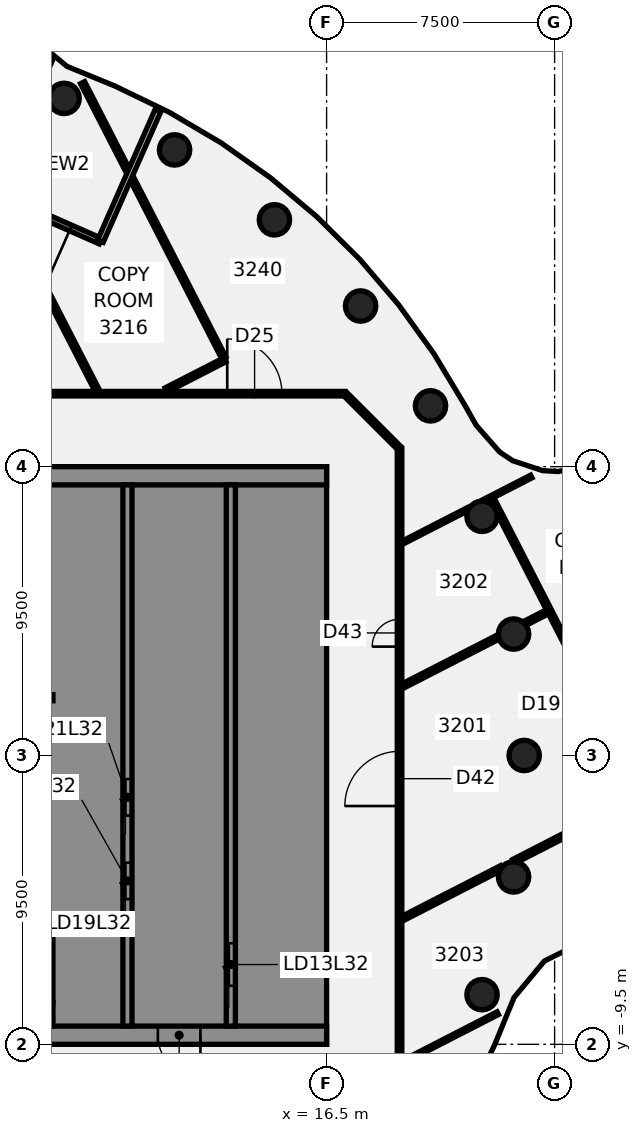
"""IFC4 building model, lengths in metres.
Left out: names, types, materials, properties, quantities, classifications, styles, units other than length and angle.
Written with IfcOpenShell. Run it as: python <this file> out.ifc"""

import sys

from ifc_helpers import new_model, si_unit, direction, frame, frame_2d, origin, origin_2d, place, context, subcontext, project, spatial, polyline, rectangle, circle, outline, extrude, element, fill, save


model = new_model("IFC4")
c1 = context("Model", 3, precision=1e-05, world=origin(), true_north=direction((0.0, 1.0)))
c2 = subcontext(c1, "Body", "Model", "MODEL_VIEW")
j1 = project(units=[si_unit("LENGTHUNIT", "METRE"), si_unit("PLANEANGLEUNIT", "RADIAN")], contexts=[c1])
p1 = place(None, origin())
s1 = spatial("IfcSite", under=j1, at=p1, CompositionType="ELEMENT")
p2 = place(p1, origin())
s2 = spatial("IfcBuilding", under=s1, at=p2, CompositionType="ELEMENT")
p3 = place(p2, frame((0.0, 0.0, 133.0)))
s3 = spatial("IfcBuildingStorey", under=s2, at=p3, CompositionType="ELEMENT", Elevation=133.0)
for number, where, z_axis, x_axis in (
    (1, (23.0, 0.0, -0.14), (0.0, 0.0, 1.0), (1.0, 0.0, 0.0)),
    (2, (22.651, 3.994, -0.14), (0.0, 0.0, 1.0), (1.0, 0.0, 0.0)),
    (3, (21.613, 7.866, -0.14), (0.0, 0.0, 1.0), (1.0, 0.0, 0.0)),
    (4, (19.919, 11.5, -0.14), (0.0, 0.0, 1.0), (1.0, 0.0, 0.0)),
    (5, (17.619, 14.784, -0.14), (0.0, 0.0, 1.0), (1.0, 0.0, 0.0)),
    (6, (14.784, 17.619, -0.14), (0.0, 0.0, 1.0), (1.0, 0.0, 0.0)),
    (7, (11.5, 19.919, -0.14), (0.0, 0.0, 1.0), (1.0, 0.0, 0.0)),
    (8, (7.866, 21.613, -0.14), (0.0, 0.0, 1.0), (1.0, 0.0, 0.0)),
    (9, (21.613, -7.866, -0.14), (0.0, 0.0, 1.0), (1.0, 0.0, 0.0)),
    (10, (22.651, -3.994, -0.14), (0.0, 0.0, 1.0), (1.0, 0.0, 0.0)),
):
    element("IfcColumn", number, at=place(p3, frame(where, z_axis=z_axis, x_axis=x_axis)), inside=s3, PredefinedType="COLUMN", context=c2, shape_type="SweptSolid", body=[
        extrude(circle(Radius=0.5, at=origin_2d()), origin(), (0.0, 0.0, 1.0), 3.75),
    ])
p4 = place(p3, frame((3.69, 22.258, 0.0), z_axis=(0.0, 0.0, 1.0), x_axis=(0.45668207617, -0.889629968754, 0.0)))
e11 = element("IfcWall", 11, at=p4, inside=s3, PredefinedType="PARTITIONING", context=c2, shape_type="SweptSolid", body=[
    extrude(rectangle(XDim=11.542, YDim=0.15, at=frame_2d((5.771, 0.0))), origin(), (0.0, 0.0, 1.0), 3.01),
])
p5 = place(p4, frame((2.95, 0.0, 0.0)))
e12 = element("IfcOpeningElement", 12, at=p5, cuts=e11, PredefinedType="OPENING", context=c2, shape_type="SweptSolid", body=[
    extrude(rectangle(XDim=0.9, YDim=2.1, at=frame_2d((0.45, 1.05))), frame((0.0, 0.085, 0.0), z_axis=(0.0, -1.0, 0.0), x_axis=(1.0, 0.0, 0.0)), (0.0, 0.0, 1.0), 0.17),
])
p6 = place(p3, frame((8.476, 22.13, 0.0), z_axis=(0.0, 0.0, 1.0), x_axis=(0.456531545436, -0.889707226014, 0.0)))
e13 = element("IfcWall", 13, at=p6, inside=s3, PredefinedType="PARTITIONING", context=c2, shape_type="SweptSolid", body=[
    extrude(rectangle(XDim=10.171, YDim=0.15, at=frame_2d((5.085, 0.0))), origin(), (0.0, 0.0, 1.0), 3.01),
])
p7 = place(p3, frame((21.934, 8.452, 0.0), z_axis=(0.0, 0.0, 1.0), x_axis=(0.456612291923, -0.889665788296, 0.0)))
e14 = element("IfcWall", 14, at=p7, inside=s3, PredefinedType="PARTITIONING", context=c2, shape_type="SweptSolid", body=[
    extrude(rectangle(XDim=14.249, YDim=0.15, at=frame_2d((7.125, 0.0))), origin(), (0.0, 0.0, 1.0), 3.01),
])
p8 = place(p7, frame((6.95, 0.0, 0.0)))
e15 = element("IfcOpeningElement", 15, at=p8, cuts=e14, PredefinedType="OPENING", context=c2, shape_type="SweptSolid", body=[
    extrude(rectangle(XDim=1.4, YDim=2.1, at=frame_2d((0.7, 1.05))), frame((0.0, 0.085, 0.0), z_axis=(0.0, -1.0, 0.0), x_axis=(1.0, 0.0, 0.0)), (0.0, 0.0, 1.0), 0.17),
])
p9 = place(p3, frame((17.128, 11.872, 0.0), z_axis=(0.0, 0.0, 1.0), x_axis=(0.707106781187, -0.707106781187, 0.0)))
e16 = element("IfcWall", 16, at=p9, inside=s3, PredefinedType="PARTITIONING", context=c2, shape_type="SweptSolid", body=[
    extrude(rectangle(XDim=2.465, YDim=0.15, at=frame_2d((1.232, 0.0))), origin(), (0.0, 0.0, 1.0), 3.01),
])
p10 = place(p3, frame((-17.065, 11.9, 0.0), z_axis=(0.0, 0.0, 1.0), x_axis=(1.0, 0.0, 0.0)))
e17 = element("IfcWall", 17, at=p10, inside=s3, PredefinedType="PARTITIONING", context=c2, shape_type="SweptSolid", body=[
    extrude(rectangle(XDim=34.165, YDim=0.15, at=frame_2d((17.083, 0.0))), origin(), (0.0, 0.0, 1.0), 3.01),
])
p11 = place(p10, frame((21.276, 0.0, 0.0)))
e18 = element("IfcOpeningElement", 18, at=p11, cuts=e17, PredefinedType="OPENING", context=c2, shape_type="SweptSolid", body=[
    extrude(rectangle(XDim=1.8, YDim=2.1, at=frame_2d((0.9, 1.05))), frame((0.0, 0.085, 0.0), z_axis=(0.0, -1.0, 0.0), x_axis=(1.0, 0.0, 0.0)), (0.0, 0.0, 1.0), 0.17),
])
p12 = place(p10, frame((30.297, 0.0, 0.0)))
e19 = element("IfcOpeningElement", 19, at=p12, cuts=e17, PredefinedType="OPENING", context=c2, shape_type="SweptSolid", body=[
    extrude(rectangle(XDim=1.8, YDim=2.1, at=frame_2d((0.9, 1.05))), frame((0.0, 0.085, 0.0), z_axis=(0.0, -1.0, 0.0), x_axis=(1.0, 0.0, 0.0)), (0.0, 0.0, 1.0), 0.17),
])
p13 = place(p10, frame((5.965, 0.0, 0.0)))
e20 = element("IfcOpeningElement", 20, at=p13, cuts=e17, PredefinedType="OPENING", context=c2, shape_type="SweptSolid", body=[
    extrude(rectangle(XDim=1.8, YDim=2.1, at=frame_2d((0.9, 1.05))), frame((0.0, 0.085, 0.0), z_axis=(0.0, -1.0, 0.0), x_axis=(1.0, 0.0, 0.0)), (0.0, 0.0, 1.0), 0.17),
])
p14 = place(p3, frame((11.222, 12.023, 0.0), z_axis=(0.0, 0.0, 1.0), x_axis=(0.889721403814, 0.456503914108, 0.0)))
e21 = element("IfcWall", 21, at=p14, inside=s3, PredefinedType="PARTITIONING", context=c2, shape_type="SweptSolid", body=[
    extrude(rectangle(XDim=2.17, YDim=0.15, at=frame_2d((1.085, 0.0))), origin(), (0.0, 0.0, 1.0), 3.01),
])
p15 = place(p3, frame((18.93, -10.118, 0.0), z_axis=(0.0, 0.0, 1.0), x_axis=(0.889666890189, 0.456610144984, 0.0)))
e22 = element("IfcWall", 22, at=p15, inside=s3, PredefinedType="PARTITIONING", context=c2, shape_type="SweptSolid", body=[
    extrude(rectangle(XDim=3.597, YDim=0.1, at=frame_2d((1.798, 0.0))), origin(), (0.0, 0.0, 1.0), 3.01),
])
p16 = place(p3, frame((18.993, -5.364, 0.0), z_axis=(0.0, 0.0, 1.0), x_axis=(0.889723982038, 0.45649888914, 0.0)))
e23 = element("IfcWall", 23, at=p16, inside=s3, PredefinedType="PARTITIONING", context=c2, shape_type="SweptSolid", body=[
    extrude(rectangle(XDim=3.671, YDim=0.15, at=frame_2d((1.836, 0.0))), origin(), (0.0, 0.0, 1.0), 3.01),
])
p17 = place(p3, frame((22.655, -3.485, 0.0), z_axis=(0.0, 0.0, 1.0), x_axis=(0.88970520017, 0.456535493461, 0.0)))
e24 = element("IfcWall", 24, at=p17, inside=s3, PredefinedType="PARTITIONING", context=c2, shape_type="SweptSolid", body=[
    extrude(rectangle(XDim=4.733, YDim=0.15, at=frame_2d((2.367, 0.0))), origin(), (0.0, 0.0, 1.0), 3.01),
])
p18 = place(p17, frame((2.55, 0.0, 0.0)))
e25 = element("IfcOpeningElement", 25, at=p18, cuts=e24, PredefinedType="OPENING", context=c2, shape_type="SweptSolid", body=[
    extrude(rectangle(XDim=0.9, YDim=2.1, at=frame_2d((0.45, 1.05))), frame((0.0, 0.085, 0.0), z_axis=(0.0, -1.0, 0.0), x_axis=(1.0, 0.0, 0.0)), (0.0, 0.0, 1.0), 0.17),
])
p19 = place(p3, frame((18.993, 2.279, 0.0), z_axis=(0.0, 0.0, 1.0), x_axis=(0.889720446933, 0.456505779054, 0.0)))
e26 = element("IfcWall", 26, at=p19, inside=s3, PredefinedType="PARTITIONING", context=c2, shape_type="SweptSolid", body=[
    extrude(rectangle(XDim=3.564, YDim=0.15, at=frame_2d((1.782, 0.0))), origin(), (0.0, 0.0, 1.0), 3.01),
])
p20 = place(p3, frame((23.004, 4.337, 0.0), z_axis=(0.0, 0.0, 1.0), x_axis=(0.889677168086, 0.456590118802, 0.0)))
e27 = element("IfcWall", 27, at=p20, inside=s3, PredefinedType="PARTITIONING", context=c2, shape_type="SweptSolid", body=[
    extrude(rectangle(XDim=0.852, YDim=0.15, at=frame_2d((0.426, 0.0))), origin(), (0.0, 0.0, 1.0), 3.01),
])
p21 = place(p3, frame((18.98, 6.992, 0.0), z_axis=(0.0, 0.0, 1.0), x_axis=(0.889616028154, 0.456709231845, 0.0)))
e28 = element("IfcWall", 28, at=p21, inside=s3, PredefinedType="PARTITIONING", context=c2, shape_type="SweptSolid", body=[
    extrude(rectangle(XDim=2.462, YDim=0.1, at=frame_2d((1.231, 0.0))), origin(), (0.0, 0.0, 1.0), 3.01),
])
p22 = place(p3, frame((21.655, 8.365, 0.0), z_axis=(0.0, 0.0, 1.0), x_axis=(0.889589674888, 0.456760561271, 0.0)))
e29 = element("IfcWall", 29, at=p22, inside=s3, PredefinedType="PARTITIONING", context=c2, shape_type="SweptSolid", body=[
    extrude(rectangle(XDim=1.775, YDim=0.1, at=frame_2d((0.888, 0.0))), origin(), (0.0, 0.0, 1.0), 3.01),
])
p23 = place(p3, frame((18.9, -10.1, 0.0), z_axis=(0.0, 0.0, 1.0), x_axis=(0.0, 1.0, 0.0)))
e30 = element("IfcWall", 30, at=p23, inside=s3, PredefinedType="PARTITIONING", context=c2, shape_type="SweptSolid", body=[
    extrude(rectangle(XDim=20.2, YDim=0.15, at=frame_2d((10.1, 0.0))), origin(), (0.0, 0.0, 1.0), 3.01),
])
p24 = place(p23, frame((8.438, 0.0, 0.0)))
e31 = element("IfcOpeningElement", 31, at=p24, cuts=e30, PredefinedType="OPENING", context=c2, shape_type="SweptSolid", body=[
    extrude(rectangle(XDim=1.8, YDim=2.1, at=frame_2d((0.9, 1.05))), frame((0.0, 0.085, 0.0), z_axis=(0.0, -1.0, 0.0), x_axis=(1.0, 0.0, 0.0)), (0.0, 0.0, 1.0), 0.17),
])
p25 = place(p23, frame((13.681, 0.0, 0.0)))
e32 = element("IfcOpeningElement", 32, at=p25, cuts=e30, PredefinedType="OPENING", context=c2, shape_type="SweptSolid", body=[
    extrude(rectangle(XDim=0.9, YDim=2.1, at=frame_2d((0.45, 1.05))), frame((0.0, 0.085, 0.0), z_axis=(0.0, -1.0, 0.0), x_axis=(1.0, 0.0, 0.0)), (0.0, 0.0, 1.0), 0.17),
])
p26 = place(p3, frame((9.061, 16.918, 0.0), z_axis=(0.0, 0.0, 1.0), x_axis=(-0.915163294104, 0.403083297999, 0.0)))
e33 = element("IfcWall", 33, at=p26, inside=s3, PredefinedType="SOLIDWALL", context=c2, shape_type="SweptSolid", body=[
    extrude(rectangle(XDim=3.94, YDim=0.2, at=frame_2d((1.97, 0.0))), origin(), (0.0, 0.0, 1.0), 3.61),
])
p27 = place(p26, frame((1.07, 0.0, 0.0)))
e34 = element("IfcOpeningElement", 34, at=p27, cuts=e33, PredefinedType="OPENING", context=c2, shape_type="SweptSolid", body=[
    extrude(rectangle(XDim=1.8, YDim=2.4, at=frame_2d((0.9, 1.2))), frame((0.0, 0.11, 0.0), z_axis=(0.0, -1.0, 0.0), x_axis=(1.0, 0.0, 0.0)), (0.0, 0.0, 1.0), 0.22),
])
p28 = place(p3, frame((9.062, 16.918, 0.0), z_axis=(0.0, 0.0, 1.0), x_axis=(0.40309695737, 0.915157277717, 0.0)))
e35 = element("IfcWall", 35, at=p28, inside=s3, PredefinedType="SOLIDWALL", context=c2, shape_type="SweptSolid", body=[
    extrude(rectangle(XDim=4.703, YDim=0.2, at=frame_2d((2.352, 0.0))), origin(), (0.0, 0.0, 1.0), 3.61),
])
p29 = place(p3, frame((5.456, 18.506, 0.0), z_axis=(0.0, 0.0, 1.0), x_axis=(0.403071348588, 0.915168557124, 0.0)))
e36 = element("IfcWall", 36, at=p29, inside=s3, PredefinedType="SOLIDWALL", context=c2, shape_type="SweptSolid", body=[
    extrude(rectangle(XDim=4.893, YDim=0.2, at=frame_2d((2.446, 0.0))), origin(), (0.0, 0.0, 1.0), 3.61),
])
p30 = place(p3, frame((16.5, -9.2, 0.0), z_axis=(0.0, 0.0, 1.0), x_axis=(-1.0, 0.0, 0.0)))
e37 = element("IfcWall", 37, at=p30, inside=s3, PredefinedType="SHEAR", context=c2, shape_type="SweptSolid", body=[
    extrude(rectangle(XDim=13.0, YDim=0.6, at=frame_2d((6.5, 0.0))), origin(), (0.0, 0.0, 1.0), 3.61),
])
p31 = place(p30, frame((4.15, 0.0, 0.0)))
e38 = element("IfcOpeningElement", 38, at=p31, cuts=e37, PredefinedType="OPENING", context=c2, shape_type="SweptSolid", body=[
    extrude(rectangle(XDim=1.4, YDim=2.1, at=frame_2d((0.7, 1.05))), frame((0.0, 0.31, 0.0), z_axis=(0.0, -1.0, 0.0), x_axis=(1.0, 0.0, 0.0)), (0.0, 0.0, 1.0), 0.62),
])
p32 = place(p30, frame((10.125, 0.0, 0.0)))
e39 = element("IfcOpeningElement", 39, at=p32, cuts=e37, PredefinedType="OPENING", context=c2, shape_type="SweptSolid", body=[
    extrude(rectangle(XDim=1.4, YDim=2.1, at=frame_2d((0.7, 1.05))), frame((0.0, 0.31, 0.0), z_axis=(0.0, -1.0, 0.0), x_axis=(1.0, 0.0, 0.0)), (0.0, 0.0, 1.0), 0.62),
])
p33 = place(p3, origin())
e40 = element("IfcWall", 40, at=p33, inside=s3, PredefinedType="SHEAR", context=c2, shape_type="SweptSolid", body=[
    extrude(outline(polyline([(13.5, -8.9), (15.9, -8.9), (16.5, -8.9), (16.5, 8.9), (15.9, 8.9), (13.5, 8.9), (13.5, 8.125), (15.9, 8.125), (15.9, 5.625), (13.5, 5.625), (13.5, 5.375), (15.9, 5.375), (15.9, 2.875), (13.5, 2.875), (13.5, 2.625), (15.9, 2.625), (15.9, 0.125), (13.5, 0.125), (13.5, -0.125), (15.9, -0.125), (15.9, -2.625), (13.5, -2.625), (13.5, -2.875), (15.9, -2.875), (15.9, -5.375), (13.5, -5.375), (13.5, -5.625), (15.9, -5.625), (15.9, -8.125), (13.5, -8.125), (13.5, -8.9)])), origin(), (0.0, 0.0, 1.0), 3.61),
])
p34 = place(p3, frame((16.5, 9.2, 0.0), z_axis=(0.0, 0.0, 1.0), x_axis=(-1.0, 0.0, 0.0)))
e41 = element("IfcWall", 41, at=p34, inside=s3, PredefinedType="SHEAR", context=c2, shape_type="SweptSolid", body=[
    extrude(rectangle(XDim=13.0, YDim=0.6, at=frame_2d((6.5, 0.0))), origin(), (0.0, 0.0, 1.0), 3.61),
])
p35 = place(p3, origin())
e42 = element("IfcWall", 42, at=p35, inside=s3, PredefinedType="SHEAR", context=c2, shape_type="SweptSolid", body=[
    extrude(outline(polyline([(9.8, -5.375), (7.5, -5.375), (7.5, -2.875), (9.8, -2.875), (9.8, -2.625), (7.5, -2.625), (7.5, -0.125), (9.8, -0.125), (9.8, 0.125), (7.5, 0.125), (7.5, 2.625), (9.8, 2.625), (9.8, 2.875), (7.5, 2.875), (7.5, 5.375), (9.8, 5.375), (9.8, 5.625), (7.5, 5.625), (7.5, 8.125), (9.8, 8.125), (9.8, 8.9), (7.5, 8.9), (7.2, 8.9), (7.2, -5.625), (7.5, -5.625), (9.8, -5.625), (9.8, -5.375)])), origin(), (0.0, 0.0, 1.0), 3.61),
])
p36 = place(p3, origin())
e43 = element("IfcWall", 43, at=p36, inside=s3, PredefinedType="SHEAR", context=c2, shape_type="SweptSolid", body=[
    extrude(outline(polyline([(7.5, -8.125), (7.5, -8.9), (9.8, -8.9), (9.8, -8.125), (9.8, -5.625), (9.55, -5.625), (9.55, -8.125), (7.5, -8.125)])), origin(), (0.0, 0.0, 1.0), 3.61),
])
p37 = place(p3, frame((7.35, -8.9, 0.0), z_axis=(0.0, 0.0, 1.0), x_axis=(0.0, 1.0, 0.0)))
e44 = element("IfcWall", 44, at=p37, inside=s3, PredefinedType="SHEAR", context=c2, shape_type="SweptSolid", body=[
    extrude(rectangle(XDim=0.775, YDim=0.3, at=frame_2d((0.387, 0.0))), origin(), (0.0, 0.0, 1.0), 3.61),
])
p38 = place(p3, frame((7.5, 1.9, 0.0), z_axis=(0.0, 0.0, 1.0), x_axis=(-1.0, 0.0, 0.0)))
e45 = element("IfcWall", 45, at=p38, inside=s3, PredefinedType="SHEAR", context=c2, shape_type="SweptSolid", body=[
    extrude(rectangle(XDim=3.3, YDim=0.2, at=frame_2d((1.65, 0.0))), origin(), (0.0, 0.0, 1.0), 3.61),
])
p39 = place(p3, frame((13.35, -8.9, 0.0), z_axis=(0.0, 0.0, 1.0), x_axis=(0.0, 1.0, 0.0)))
e46 = element("IfcWall", 46, at=p39, inside=s3, PredefinedType="SHEAR", context=c2, shape_type="SweptSolid", body=[
    extrude(rectangle(XDim=17.8, YDim=0.3, at=frame_2d((8.9, 0.0))), origin(), (0.0, 0.0, 1.0), 3.61),
])
p40 = place(p39, frame((1.325, 0.0, 0.0)))
e47 = element("IfcOpeningElement", 47, at=p40, cuts=e46, PredefinedType="OPENING", context=c2, shape_type="SweptSolid", body=[
    extrude(rectangle(XDim=1.4, YDim=2.1, at=frame_2d((0.7, 1.05))), frame((0.0, 0.16, 0.0), z_axis=(0.0, -1.0, 0.0), x_axis=(1.0, 0.0, 0.0)), (0.0, 0.0, 1.0), 0.32),
])
p41 = place(p3, frame((9.95, -8.9, 0.0), z_axis=(0.0, 0.0, 1.0), x_axis=(0.0, 1.0, 0.0)))
e48 = element("IfcWall", 48, at=p41, inside=s3, PredefinedType="SHEAR", context=c2, shape_type="SweptSolid", body=[
    extrude(rectangle(XDim=17.8, YDim=0.3, at=frame_2d((8.9, 0.0))), origin(), (0.0, 0.0, 1.0), 3.61),
])
p42 = place(p41, frame((4.175, 0.0, 0.0)))
e49 = element("IfcOpeningElement", 49, at=p42, cuts=e48, PredefinedType="OPENING", context=c2, shape_type="SweptSolid", body=[
    extrude(rectangle(XDim=1.2, YDim=2.1, at=frame_2d((0.6, 1.05))), frame((0.0, 0.16, 0.0), z_axis=(0.0, -1.0, 0.0), x_axis=(1.0, 0.0, 0.0)), (0.0, 0.0, 1.0), 0.32),
])
p43 = place(p41, frame((6.925, 0.0, 0.0)))
e50 = element("IfcOpeningElement", 50, at=p43, cuts=e48, PredefinedType="OPENING", context=c2, shape_type="SweptSolid", body=[
    extrude(rectangle(XDim=1.2, YDim=2.1, at=frame_2d((0.6, 1.05))), frame((0.0, 0.16, 0.0), z_axis=(0.0, -1.0, 0.0), x_axis=(1.0, 0.0, 0.0)), (0.0, 0.0, 1.0), 0.32),
])
p44 = place(p3, frame((7.35, -8.125, 0.0), z_axis=(0.0, 0.0, 1.0), x_axis=(0.0, 1.0, 0.0)))
e51 = element("IfcWall", 51, at=p44, inside=s3, PredefinedType="SHEAR", context=c2, shape_type="SweptSolid", body=[
    extrude(rectangle(XDim=2.5, YDim=0.3, at=frame_2d((1.25, 0.0))), origin(), (0.0, 0.0, 1.0), 3.61),
])
p45 = place(p44, frame((0.7, 0.0, 0.0)))
e52 = element("IfcOpeningElement", 52, at=p45, cuts=e51, PredefinedType="OPENING", context=c2, shape_type="SweptSolid", body=[
    extrude(rectangle(XDim=1.1, YDim=2.1, at=frame_2d((0.55, 1.05))), frame((0.0, 0.16, 0.0), z_axis=(0.0, -1.0, 0.0), x_axis=(1.0, 0.0, 0.0)), (0.0, 0.0, 1.0), 0.32),
])
p46 = place(p12, origin())
e53 = element("IfcDoor", 53, at=p46, inside=s3, OperationType="DOUBLE_DOOR_SINGLE_SWING", PredefinedType="DOOR", context=c2, shape_type="SweptSolid", body=[
    extrude(rectangle(XDim=1.8, YDim=2.1, at=frame_2d((0.9, 1.05))), frame((0.0, 0.025, 0.0), z_axis=(0.0, -1.0, 0.0), x_axis=(1.0, 0.0, 0.0)), (0.0, 0.0, 1.0), 0.05),
])
fill(e19, e53)
p47 = place(p24, origin())
e54 = element("IfcDoor", 54, at=p47, inside=s3, OperationType="DOUBLE_DOOR_SINGLE_SWING", PredefinedType="DOOR", context=c2, shape_type="SweptSolid", body=[
    extrude(rectangle(XDim=1.8, YDim=2.1, at=frame_2d((0.9, 1.05))), frame((0.0, 0.025, 0.0), z_axis=(0.0, -1.0, 0.0), x_axis=(1.0, 0.0, 0.0)), (0.0, 0.0, 1.0), 0.05),
])
fill(e31, e54)
p48 = place(p25, frame((0.9, 0.0, 0.0), z_axis=(0.0, 0.0, 1.0), x_axis=(-1.0, 0.0, 0.0)))
e55 = element("IfcDoor", 55, at=p48, inside=s3, OperationType="SINGLE_SWING_RIGHT", PredefinedType="DOOR", context=c2, shape_type="SweptSolid", body=[
    extrude(rectangle(XDim=0.9, YDim=2.1, at=frame_2d((0.45, 1.05))), frame((0.0, 0.025, 0.0), z_axis=(0.0, -1.0, 0.0), x_axis=(1.0, 0.0, 0.0)), (0.0, 0.0, 1.0), 0.05),
])
fill(e32, e55)
p49 = place(p27, origin())
e56 = element("IfcDoor", 56, at=p49, inside=s3, OperationType="SINGLE_SWING_LEFT", PredefinedType="DOOR", context=c2, shape_type="SweptSolid", body=[
    extrude(rectangle(XDim=1.8, YDim=2.4, at=frame_2d((0.9, 1.2))), frame((0.0, 0.025, 0.0), z_axis=(0.0, -1.0, 0.0), x_axis=(1.0, 0.0, 0.0)), (0.0, 0.0, 1.0), 0.05),
])
fill(e34, e56)
p50 = place(p31, origin())
e57 = element("IfcDoor", 57, at=p50, inside=s3, OperationType="SINGLE_SWING_LEFT", PredefinedType="DOOR", context=c2, shape_type="SweptSolid", body=[
    extrude(rectangle(XDim=1.4, YDim=2.1, at=frame_2d((0.7, 1.05))), frame((0.0, 0.025, 0.0), z_axis=(0.0, -1.0, 0.0), x_axis=(1.0, 0.0, 0.0)), (0.0, 0.0, 1.0), 0.05),
])
fill(e38, e57)
p51 = place(p40, origin())
e58 = element("IfcDoor", 58, at=p51, inside=s3, OperationType="SLIDING_TO_LEFT", PredefinedType="DOOR", context=c2, shape_type="SweptSolid", body=[
    extrude(rectangle(XDim=1.4, YDim=2.1, at=frame_2d((0.7, 1.05))), frame((0.0, 0.025, 0.0), z_axis=(0.0, -1.0, 0.0), x_axis=(1.0, 0.0, 0.0)), (0.0, 0.0, 1.0), 0.05),
])
fill(e47, e58)
p52 = place(p42, origin())
e59 = element("IfcDoor", 59, at=p52, inside=s3, OperationType="SLIDING_TO_LEFT", PredefinedType="DOOR", context=c2, shape_type="SweptSolid", body=[
    extrude(rectangle(XDim=1.2, YDim=2.1, at=frame_2d((0.6, 1.05))), frame((0.0, 0.025, 0.0), z_axis=(0.0, -1.0, 0.0), x_axis=(1.0, 0.0, 0.0)), (0.0, 0.0, 1.0), 0.05),
])
fill(e49, e59)
p53 = place(p43, origin())
e60 = element("IfcDoor", 60, at=p53, inside=s3, OperationType="SLIDING_TO_LEFT", PredefinedType="DOOR", context=c2, shape_type="SweptSolid", body=[
    extrude(rectangle(XDim=1.2, YDim=2.1, at=frame_2d((0.6, 1.05))), frame((0.0, 0.025, 0.0), z_axis=(0.0, -1.0, 0.0), x_axis=(1.0, 0.0, 0.0)), (0.0, 0.0, 1.0), 0.05),
])
fill(e50, e60)
save(model, sys.argv[1])
